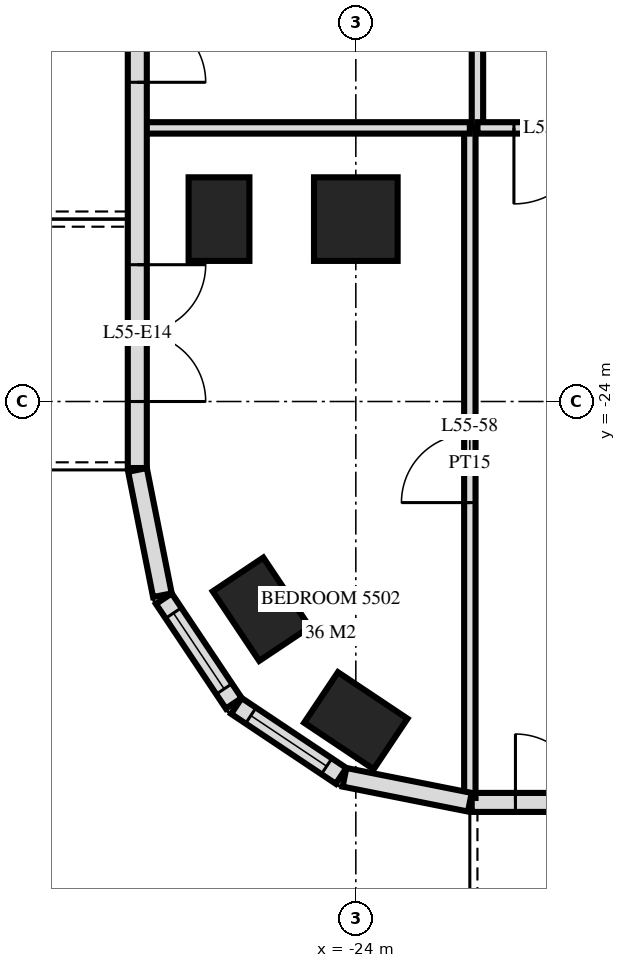
"""IFC4 building model, lengths in metres.
Left out: names, types, materials, properties, quantities, classifications, styles, units other than length and angle.
Written with IfcOpenShell. Run it as: python <this file> out.ifc"""

import sys

from ifc_helpers import new_model, si_unit, direction, frame, frame_2d, origin, origin_2d, place, context, subcontext, project, spatial, rectangle, extrude, element, fill, save


model = new_model("IFC4")
c1 = context("Model", 3, precision=1e-05, world=origin(), true_north=direction((0.0, 1.0)))
c2 = subcontext(c1, "Body", "Model", "MODEL_VIEW")
j1 = project(units=[si_unit("LENGTHUNIT", "METRE"), si_unit("PLANEANGLEUNIT", "RADIAN")], contexts=[c1])
p1 = place(None, origin())
s1 = spatial("IfcSite", under=j1, at=p1, CompositionType="ELEMENT")
p2 = place(p1, origin())
s2 = spatial("IfcBuilding", under=s1, at=p2, CompositionType="ELEMENT")
p3 = place(p2, frame((0.0, 0.0, 211.6)))
s3 = spatial("IfcBuildingStorey", under=s2, at=p3, CompositionType="ELEMENT", Elevation=211.6)
for number, where, z_axis, x_axis in (
    (1, (-25.8, -21.6, 0.0), (0.0, 0.0, 1.0), (0.0, 1.0, 0.0)),
    (2, (-25.244, -26.733, 0.0), (0.0, 0.0, 1.0), (-0.556, 0.831, 0.0)),
    (3, (-24.0, -28.2, 0.0), (0.0, 0.0, 1.0), (-0.831, 0.556, 0.0)),
):
    element("IfcColumn", number, at=place(p3, frame(where, z_axis=z_axis, x_axis=x_axis)), inside=s3, PredefinedType="COLUMN", context=c2, shape_type="SweptSolid", body=[
        extrude(rectangle(XDim=1.1, YDim=0.8, at=origin_2d()), origin(), (0.0, 0.0, 1.0), 3.5),
    ])
p4 = place(p3, frame((-24.0, -21.6, 0.0), z_axis=(0.0, 0.0, 1.0), x_axis=(1.0, 0.0, 0.0)))
e4 = element("IfcColumn", 4, at=p4, inside=s3, PredefinedType="COLUMN", context=c2, shape_type="SweptSolid", body=[
    extrude(rectangle(XDim=1.1, YDim=1.1, at=origin_2d()), origin(), (0.0, 0.0, 1.0), 3.5),
])
p5 = place(p3, frame((-26.875, -3.325, 0.0), z_axis=(0.0, 0.0, 1.0), x_axis=(0.0, -1.0, 0.0)))
e5 = element("IfcWall", 5, at=p5, inside=s3, PredefinedType="SOLIDWALL", context=c2, shape_type="SweptSolid", body=[
    extrude(rectangle(XDim=21.551, YDim=0.25, at=frame_2d((10.775, 0.0))), origin(), (0.0, 0.0, 1.0), 3.22),
])
p6 = place(p5, frame((6.65, 0.0, 0.0)))
e6 = element("IfcOpeningElement", 6, at=p6, cuts=e5, PredefinedType="OPENING", context=c2, shape_type="SweptSolid", body=[
    extrude(rectangle(XDim=1.8, YDim=2.4, at=frame_2d((0.9, 1.2))), frame((0.0, 0.135, 0.0), z_axis=(0.0, -1.0, 0.0), x_axis=(1.0, 0.0, 0.0)), (0.0, 0.0, 1.0), 0.27),
])
p7 = place(p5, frame((12.275, 0.0, 0.9)))
e7 = element("IfcOpeningElement", 7, at=p7, cuts=e5, PredefinedType="OPENING", context=c2, shape_type="SweptSolid", body=[
    extrude(rectangle(XDim=1.2, YDim=1.5, at=frame_2d((0.6, 0.75))), frame((0.0, 0.135, 0.0), z_axis=(0.0, -1.0, 0.0), x_axis=(1.0, 0.0, 0.0)), (0.0, 0.0, 1.0), 0.27),
])
p8 = place(p5, frame((14.675, 0.0, 0.0)))
e8 = element("IfcOpeningElement", 8, at=p8, cuts=e5, PredefinedType="OPENING", context=c2, shape_type="SweptSolid", body=[
    extrude(rectangle(XDim=1.8, YDim=2.4, at=frame_2d((0.9, 1.2))), frame((0.0, 0.135, 0.0), z_axis=(0.0, -1.0, 0.0), x_axis=(1.0, 0.0, 0.0)), (0.0, 0.0, 1.0), 0.27),
])
p9 = place(p5, frame((18.875, 0.0, 0.0)))
e9 = element("IfcOpeningElement", 9, at=p9, cuts=e5, PredefinedType="OPENING", context=c2, shape_type="SweptSolid", body=[
    extrude(rectangle(XDim=1.8, YDim=2.4, at=frame_2d((0.9, 1.2))), frame((0.0, 0.135, 0.0), z_axis=(0.0, -1.0, 0.0), x_axis=(1.0, 0.0, 0.0)), (0.0, 0.0, 1.0), 0.27),
])
p10 = place(p3, frame((-26.873, -24.9, 0.0), z_axis=(0.0, 0.0, 1.0), x_axis=(0.195026884138, -0.980797896849, 0.0)))
e10 = element("IfcWall", 10, at=p10, inside=s3, PredefinedType="SOLIDWALL", context=c2, shape_type="SweptSolid", body=[
    extrude(rectangle(XDim=1.681, YDim=0.25, at=frame_2d((0.841, 0.0))), origin(), (0.0, 0.0, 1.0), 3.22),
])
p11 = place(p3, frame((-26.526, -26.594, 0.0), z_axis=(0.0, 0.0, 1.0), x_axis=(0.55555029066, -0.831482937015, 0.0)))
e11 = element("IfcWall", 11, at=p11, inside=s3, PredefinedType="SOLIDWALL", context=c2, shape_type="SweptSolid", body=[
    extrude(rectangle(XDim=1.656, YDim=0.25, at=frame_2d((0.828, 0.0))), origin(), (0.0, 0.0, 1.0), 3.22),
])
p12 = place(p11, frame((0.228, 0.0, 0.9)))
e12 = element("IfcOpeningElement", 12, at=p12, cuts=e11, PredefinedType="OPENING", context=c2, shape_type="SweptSolid", body=[
    extrude(rectangle(XDim=1.2, YDim=1.5, at=frame_2d((0.6, 0.75))), frame((0.0, 0.135, 0.0), z_axis=(0.0, -1.0, 0.0), x_axis=(1.0, 0.0, 0.0)), (0.0, 0.0, 1.0), 0.27),
])
p13 = place(p3, frame((-25.571, -28.006, 0.0), z_axis=(0.0, 0.0, 1.0), x_axis=(0.831482937015, -0.55555029066, 0.0)))
e13 = element("IfcWall", 13, at=p13, inside=s3, PredefinedType="SOLIDWALL", context=c2, shape_type="SweptSolid", body=[
    extrude(rectangle(XDim=1.656, YDim=0.25, at=frame_2d((0.828, 0.0))), origin(), (0.0, 0.0, 1.0), 3.22),
])
p14 = place(p13, frame((0.228, 0.0, 0.9)))
e14 = element("IfcOpeningElement", 14, at=p14, cuts=e13, PredefinedType="OPENING", context=c2, shape_type="SweptSolid", body=[
    extrude(rectangle(XDim=1.2, YDim=1.5, at=frame_2d((0.6, 0.75))), frame((0.0, 0.135, 0.0), z_axis=(0.0, -1.0, 0.0), x_axis=(1.0, 0.0, 0.0)), (0.0, 0.0, 1.0), 0.27),
])
p15 = place(p3, frame((-24.149, -28.945, 0.0), z_axis=(0.0, 0.0, 1.0), x_axis=(0.980775640221, -0.19513878023, 0.0)))
e15 = element("IfcWall", 15, at=p15, inside=s3, PredefinedType="SOLIDWALL", context=c2, shape_type="SweptSolid", body=[
    extrude(rectangle(XDim=1.681, YDim=0.25, at=frame_2d((0.841, 0.0))), origin(), (0.0, 0.0, 1.0), 3.22),
])
p16 = place(p3, frame((-22.475, -29.275, 0.0), z_axis=(0.0, 0.0, 1.0), x_axis=(1.0, 0.0, 0.0)))
e16 = element("IfcWall", 16, at=p16, inside=s3, PredefinedType="SOLIDWALL", context=c2, shape_type="SweptSolid", body=[
    extrude(rectangle(XDim=44.951, YDim=0.25, at=frame_2d((22.475, 0.0))), origin(), (0.0, 0.0, 1.0), 3.22),
])
p17 = place(p16, frame((0.575, 0.0, 0.0)))
e17 = element("IfcOpeningElement", 17, at=p17, cuts=e16, PredefinedType="OPENING", context=c2, shape_type="SweptSolid", body=[
    extrude(rectangle(XDim=1.8, YDim=2.4, at=frame_2d((0.9, 1.2))), frame((0.0, 0.135, 0.0), z_axis=(0.0, -1.0, 0.0), x_axis=(1.0, 0.0, 0.0)), (0.0, 0.0, 1.0), 0.27),
])
p18 = place(p16, frame((6.2, 0.0, 0.0)))
e18 = element("IfcOpeningElement", 18, at=p18, cuts=e16, PredefinedType="OPENING", context=c2, shape_type="SweptSolid", body=[
    extrude(rectangle(XDim=1.8, YDim=2.4, at=frame_2d((0.9, 1.2))), frame((0.0, 0.135, 0.0), z_axis=(0.0, -1.0, 0.0), x_axis=(1.0, 0.0, 0.0)), (0.0, 0.0, 1.0), 0.27),
])
p19 = place(p16, frame((8.45, 0.0, 0.9)))
e19 = element("IfcOpeningElement", 19, at=p19, cuts=e16, PredefinedType="OPENING", context=c2, shape_type="SweptSolid", body=[
    extrude(rectangle(XDim=1.8, YDim=1.5, at=frame_2d((0.9, 0.75))), frame((0.0, 0.135, 0.0), z_axis=(0.0, -1.0, 0.0), x_axis=(1.0, 0.0, 0.0)), (0.0, 0.0, 1.0), 0.27),
])
p20 = place(p16, frame((11.075, 0.0, 0.0)))
e20 = element("IfcOpeningElement", 20, at=p20, cuts=e16, PredefinedType="OPENING", context=c2, shape_type="SweptSolid", body=[
    extrude(rectangle(XDim=1.8, YDim=2.4, at=frame_2d((0.9, 1.2))), frame((0.0, 0.135, 0.0), z_axis=(0.0, -1.0, 0.0), x_axis=(1.0, 0.0, 0.0)), (0.0, 0.0, 1.0), 0.27),
])
p21 = place(p16, frame((13.775, 0.0, 0.9)))
e21 = element("IfcOpeningElement", 21, at=p21, cuts=e16, PredefinedType="OPENING", context=c2, shape_type="SweptSolid", body=[
    extrude(rectangle(XDim=2.4, YDim=1.5, at=frame_2d((1.2, 0.75))), frame((0.0, 0.135, 0.0), z_axis=(0.0, -1.0, 0.0), x_axis=(1.0, 0.0, 0.0)), (0.0, 0.0, 1.0), 0.27),
])
p22 = place(p16, frame((16.775, 0.0, 0.9)))
e22 = element("IfcOpeningElement", 22, at=p22, cuts=e16, PredefinedType="OPENING", context=c2, shape_type="SweptSolid", body=[
    extrude(rectangle(XDim=2.4, YDim=1.5, at=frame_2d((1.2, 0.75))), frame((0.0, 0.135, 0.0), z_axis=(0.0, -1.0, 0.0), x_axis=(1.0, 0.0, 0.0)), (0.0, 0.0, 1.0), 0.27),
])
p23 = place(p16, frame((20.075, 0.0, 0.0)))
e23 = element("IfcOpeningElement", 23, at=p23, cuts=e16, PredefinedType="OPENING", context=c2, shape_type="SweptSolid", body=[
    extrude(rectangle(XDim=1.8, YDim=2.4, at=frame_2d((0.9, 1.2))), frame((0.0, 0.135, 0.0), z_axis=(0.0, -1.0, 0.0), x_axis=(1.0, 0.0, 0.0)), (0.0, 0.0, 1.0), 0.27),
])
p24 = place(p16, frame((23.075, 0.0, 0.0)))
e24 = element("IfcOpeningElement", 24, at=p24, cuts=e16, PredefinedType="OPENING", context=c2, shape_type="SweptSolid", body=[
    extrude(rectangle(XDim=1.8, YDim=2.4, at=frame_2d((0.9, 1.2))), frame((0.0, 0.135, 0.0), z_axis=(0.0, -1.0, 0.0), x_axis=(1.0, 0.0, 0.0)), (0.0, 0.0, 1.0), 0.27),
])
p25 = place(p16, frame((25.775, 0.0, 0.9)))
e25 = element("IfcOpeningElement", 25, at=p25, cuts=e16, PredefinedType="OPENING", context=c2, shape_type="SweptSolid", body=[
    extrude(rectangle(XDim=2.4, YDim=1.5, at=frame_2d((1.2, 0.75))), frame((0.0, 0.135, 0.0), z_axis=(0.0, -1.0, 0.0), x_axis=(1.0, 0.0, 0.0)), (0.0, 0.0, 1.0), 0.27),
])
p26 = place(p16, frame((29.075, 0.0, 0.0)))
e26 = element("IfcOpeningElement", 26, at=p26, cuts=e16, PredefinedType="OPENING", context=c2, shape_type="SweptSolid", body=[
    extrude(rectangle(XDim=1.8, YDim=2.4, at=frame_2d((0.9, 1.2))), frame((0.0, 0.135, 0.0), z_axis=(0.0, -1.0, 0.0), x_axis=(1.0, 0.0, 0.0)), (0.0, 0.0, 1.0), 0.27),
])
p27 = place(p16, frame((31.775, 0.0, 0.9)))
e27 = element("IfcOpeningElement", 27, at=p27, cuts=e16, PredefinedType="OPENING", context=c2, shape_type="SweptSolid", body=[
    extrude(rectangle(XDim=2.4, YDim=1.5, at=frame_2d((1.2, 0.75))), frame((0.0, 0.135, 0.0), z_axis=(0.0, -1.0, 0.0), x_axis=(1.0, 0.0, 0.0)), (0.0, 0.0, 1.0), 0.27),
])
p28 = place(p16, frame((34.775, 0.0, 0.9)))
e28 = element("IfcOpeningElement", 28, at=p28, cuts=e16, PredefinedType="OPENING", context=c2, shape_type="SweptSolid", body=[
    extrude(rectangle(XDim=2.4, YDim=1.5, at=frame_2d((1.2, 0.75))), frame((0.0, 0.135, 0.0), z_axis=(0.0, -1.0, 0.0), x_axis=(1.0, 0.0, 0.0)), (0.0, 0.0, 1.0), 0.27),
])
p29 = place(p16, frame((38.075, 0.0, 0.0)))
e29 = element("IfcOpeningElement", 29, at=p29, cuts=e16, PredefinedType="OPENING", context=c2, shape_type="SweptSolid", body=[
    extrude(rectangle(XDim=1.8, YDim=2.4, at=frame_2d((0.9, 1.2))), frame((0.0, 0.135, 0.0), z_axis=(0.0, -1.0, 0.0), x_axis=(1.0, 0.0, 0.0)), (0.0, 0.0, 1.0), 0.27),
])
p30 = place(p16, frame((41.075, 0.0, 0.0)))
e30 = element("IfcOpeningElement", 30, at=p30, cuts=e16, PredefinedType="OPENING", context=c2, shape_type="SweptSolid", body=[
    extrude(rectangle(XDim=1.8, YDim=2.4, at=frame_2d((0.9, 1.2))), frame((0.0, 0.135, 0.0), z_axis=(0.0, -1.0, 0.0), x_axis=(1.0, 0.0, 0.0)), (0.0, 0.0, 1.0), 0.27),
])
p31 = place(p3, frame((-22.4, -20.4, 0.0), z_axis=(0.0, 0.0, 1.0), x_axis=(0.0, 1.0, 0.0)))
e31 = element("IfcWall", 31, at=p31, inside=s3, PredefinedType="PARTITIONING", context=c2, shape_type="SweptSolid", body=[
    extrude(rectangle(XDim=3.0, YDim=0.15, at=frame_2d((1.5, 0.0))), origin(), (0.0, 0.0, 1.0), 3.22),
])
p32 = place(p3, frame((-22.5, -29.217, 0.0), z_axis=(0.0, 0.0, 1.0), x_axis=(0.0, 1.0, 0.0)))
e32 = element("IfcWall", 32, at=p32, inside=s3, PredefinedType="PARTITIONING", context=c2, shape_type="SweptSolid", body=[
    extrude(rectangle(XDim=8.817, YDim=0.15, at=frame_2d((4.408, 0.0))), origin(), (0.0, 0.0, 1.0), 3.22),
])
p33 = place(p32, frame((3.886, 0.0, 0.0)))
e33 = element("IfcOpeningElement", 33, at=p33, cuts=e32, PredefinedType="OPENING", context=c2, shape_type="SweptSolid", body=[
    extrude(rectangle(XDim=0.9, YDim=2.1, at=frame_2d((0.45, 1.05))), frame((0.0, 0.085, 0.0), z_axis=(0.0, -1.0, 0.0), x_axis=(1.0, 0.0, 0.0)), (0.0, 0.0, 1.0), 0.17),
])
p34 = place(p3, frame((-22.4, -20.4, 0.0), z_axis=(0.0, 0.0, 1.0), x_axis=(1.0, 0.0, 0.0)))
e34 = element("IfcWall", 34, at=p34, inside=s3, PredefinedType="PARTITIONING", context=c2, shape_type="SweptSolid", body=[
    extrude(rectangle(XDim=2.0, YDim=0.15, at=frame_2d((1.0, 0.0))), origin(), (0.0, 0.0, 1.0), 3.22),
])
p35 = place(p34, frame((0.48, 0.0, 0.0)))
e35 = element("IfcOpeningElement", 35, at=p35, cuts=e34, PredefinedType="OPENING", context=c2, shape_type="SweptSolid", body=[
    extrude(rectangle(XDim=1.0, YDim=2.1, at=frame_2d((0.5, 1.05))), frame((0.0, 0.085, 0.0), z_axis=(0.0, -1.0, 0.0), x_axis=(1.0, 0.0, 0.0)), (0.0, 0.0, 1.0), 0.17),
])
p36 = place(p3, frame((-26.82, -20.4, 0.0), z_axis=(0.0, 0.0, 1.0), x_axis=(1.0, 0.0, 0.0)))
e36 = element("IfcWall", 36, at=p36, inside=s3, PredefinedType="PARTITIONING", context=c2, shape_type="SweptSolid", body=[
    extrude(rectangle(XDim=4.32, YDim=0.15, at=frame_2d((2.16, 0.0))), origin(), (0.0, 0.0, 1.0), 3.22),
])
p37 = place(p12, origin())
e37 = element("IfcWindow", 37, at=p37, inside=s3, PartitioningType="SINGLE_PANEL", PredefinedType="WINDOW", context=c2, shape_type="SweptSolid", body=[
    extrude(rectangle(XDim=1.2, YDim=1.5, at=frame_2d((0.6, 0.75))), frame((0.0, 0.03, 0.0), z_axis=(0.0, -1.0, 0.0), x_axis=(1.0, 0.0, 0.0)), (0.0, 0.0, 1.0), 0.06),
])
fill(e12, e37)
p38 = place(p14, origin())
e38 = element("IfcWindow", 38, at=p38, inside=s3, PartitioningType="SINGLE_PANEL", PredefinedType="WINDOW", context=c2, shape_type="SweptSolid", body=[
    extrude(rectangle(XDim=1.2, YDim=1.5, at=frame_2d((0.6, 0.75))), frame((0.0, 0.03, 0.0), z_axis=(0.0, -1.0, 0.0), x_axis=(1.0, 0.0, 0.0)), (0.0, 0.0, 1.0), 0.06),
])
fill(e14, e38)
p39 = place(p17, origin())
e39 = element("IfcDoor", 39, at=p39, inside=s3, OperationType="DOUBLE_DOOR_SINGLE_SWING", PredefinedType="DOOR", context=c2, shape_type="SweptSolid", body=[
    extrude(rectangle(XDim=1.8, YDim=2.4, at=frame_2d((0.9, 1.2))), frame((0.0, 0.025, 0.0), z_axis=(0.0, -1.0, 0.0), x_axis=(1.0, 0.0, 0.0)), (0.0, 0.0, 1.0), 0.05),
])
fill(e17, e39)
p40 = place(p8, origin())
e40 = element("IfcDoor", 40, at=p40, inside=s3, OperationType="DOUBLE_DOOR_SINGLE_SWING", PredefinedType="DOOR", context=c2, shape_type="SweptSolid", body=[
    extrude(rectangle(XDim=1.8, YDim=2.4, at=frame_2d((0.9, 1.2))), frame((0.0, 0.025, 0.0), z_axis=(0.0, -1.0, 0.0), x_axis=(1.0, 0.0, 0.0)), (0.0, 0.0, 1.0), 0.05),
])
fill(e8, e40)
p41 = place(p9, origin())
e41 = element("IfcDoor", 41, at=p41, inside=s3, OperationType="DOUBLE_DOOR_SINGLE_SWING", PredefinedType="DOOR", context=c2, shape_type="SweptSolid", body=[
    extrude(rectangle(XDim=1.8, YDim=2.4, at=frame_2d((0.9, 1.2))), frame((0.0, 0.025, 0.0), z_axis=(0.0, -1.0, 0.0), x_axis=(1.0, 0.0, 0.0)), (0.0, 0.0, 1.0), 0.05),
])
fill(e9, e41)
p42 = place(p35, frame((0.5, 0.0, 0.0), z_axis=(0.0, 0.0, 1.0), x_axis=(-1.0, 0.0, 0.0)))
e42 = element("IfcDoor", 42, at=p42, inside=s3, OperationType="SINGLE_SWING_LEFT", PredefinedType="DOOR", context=c2, shape_type="SweptSolid", body=[
    extrude(rectangle(XDim=1.0, YDim=2.1, at=frame_2d((0.0, 1.05))), frame((0.0, -0.025, 0.0), z_axis=(0.0, 1.0, 0.0), x_axis=(-1.0, 0.0, 0.0)), (0.0, 0.0, 1.0), 0.05),
])
fill(e35, e42)
p43 = place(p33, origin())
e43 = element("IfcDoor", 43, at=p43, inside=s3, OperationType="SINGLE_SWING_RIGHT", PredefinedType="DOOR", context=c2, shape_type="SweptSolid", body=[
    extrude(rectangle(XDim=0.9, YDim=2.1, at=frame_2d((0.45, 1.05))), frame((0.0, 0.025, 0.0), z_axis=(0.0, -1.0, 0.0), x_axis=(1.0, 0.0, 0.0)), (0.0, 0.0, 1.0), 0.05),
])
fill(e33, e43)
save(model, sys.argv[1])
